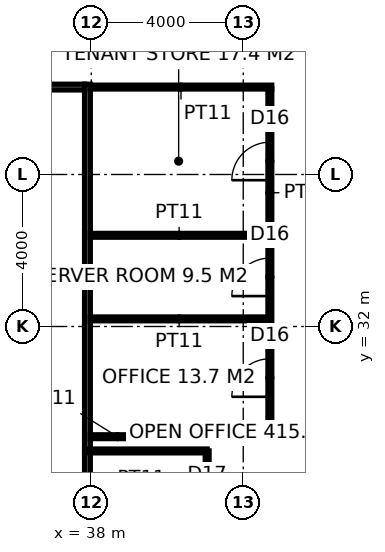
"""IFC4 building model, lengths in metres.
Left out: names, types, materials, properties, quantities, classifications, styles, units other than length and angle.
Written with IfcOpenShell. Run it as: python <this file> out.ifc"""

import sys

from ifc_helpers import new_model, si_unit, direction, frame, frame_2d, origin, place, context, subcontext, project, spatial, rectangle, extrude, element, fill, save


model = new_model("IFC4")
c1 = context("Model", 3, precision=1e-05, world=origin(), true_north=direction((0.0, 1.0)))
c2 = subcontext(c1, "Body", "Model", "MODEL_VIEW")
j1 = project(units=[si_unit("LENGTHUNIT", "METRE"), si_unit("PLANEANGLEUNIT", "RADIAN")], contexts=[c1])
p1 = place(None, origin())
s1 = spatial("IfcSite", under=j1, at=p1, CompositionType="ELEMENT")
p2 = place(p1, origin())
s2 = spatial("IfcBuilding", under=s1, at=p2, CompositionType="ELEMENT")
p3 = place(p2, frame((0.0, 0.0, 199.8)))
s3 = spatial("IfcBuildingStorey", under=s2, at=p3, CompositionType="ELEMENT", Elevation=199.8)
p4 = place(p3, frame((37.9, 15.625, 0.0), z_axis=(0.0, 0.0, 1.0), x_axis=(0.0, 1.0, 0.0)))
e1 = element("IfcWall", 1, at=p4, inside=s3, PredefinedType="PARTITIONING", context=c2, shape_type="SweptSolid", body=[
    extrude(rectangle(XDim=22.75, YDim=0.15, at=frame_2d((11.375, 0.0))), origin(), (0.0, 0.0, 1.0), 2.85),
])
p5 = place(p4, frame((10.475, 0.0, 0.0)))
e2 = element("IfcOpeningElement", 2, at=p5, cuts=e1, PredefinedType="OPENING", context=c2, shape_type="SweptSolid", body=[
    extrude(rectangle(XDim=1.8, YDim=2.4, at=frame_2d((0.9, 1.2))), frame((0.0, 0.085, 0.0), z_axis=(0.0, -1.0, 0.0), x_axis=(1.0, 0.0, 0.0)), (0.0, 0.0, 1.0), 0.17),
])
p6 = place(p3, frame((17.5, 38.3, 0.0), z_axis=(0.0, 0.0, 1.0), x_axis=(1.0, 0.0, 0.0)))
e3 = element("IfcWall", 3, at=p6, inside=s3, PredefinedType="PARTITIONING", context=c2, shape_type="SweptSolid", body=[
    extrude(rectangle(XDim=20.325, YDim=0.15, at=frame_2d((10.163, 0.0))), origin(), (0.0, 0.0, 1.0), 3.85),
])
p7 = place(p6, frame((6.25, 0.0, 0.0)))
e4 = element("IfcOpeningElement", 4, at=p7, cuts=e3, PredefinedType="OPENING", context=c2, shape_type="SweptSolid", body=[
    extrude(rectangle(XDim=0.9, YDim=2.1, at=frame_2d((0.45, 1.05))), frame((0.0, 0.085, 0.0), z_axis=(0.0, -1.0, 0.0), x_axis=(1.0, 0.0, 0.0)), (0.0, 0.0, 1.0), 0.17),
])
p8 = place(p6, frame((10.0, 0.0, 0.0)))
e5 = element("IfcOpeningElement", 5, at=p8, cuts=e3, PredefinedType="OPENING", context=c2, shape_type="SweptSolid", body=[
    extrude(rectangle(XDim=1.0, YDim=2.1, at=frame_2d((0.5, 1.05))), frame((0.0, 0.085, 0.0), z_axis=(0.0, -1.0, 0.0), x_axis=(1.0, 0.0, 0.0)), (0.0, 0.0, 1.0), 0.17),
])
p9 = place(p6, frame((13.85, 0.0, 0.0)))
e6 = element("IfcOpeningElement", 6, at=p9, cuts=e3, PredefinedType="OPENING", context=c2, shape_type="SweptSolid", body=[
    extrude(rectangle(XDim=0.9, YDim=2.1, at=frame_2d((0.45, 1.05))), frame((0.0, 0.085, 0.0), z_axis=(0.0, -1.0, 0.0), x_axis=(1.0, 0.0, 0.0)), (0.0, 0.0, 1.0), 0.17),
])
p10 = place(p3, frame((37.975, 29.1, 0.0), z_axis=(0.0, 0.0, 1.0), x_axis=(1.0, 0.0, 0.0)))
e7 = element("IfcWall", 7, at=p10, inside=s3, PredefinedType="PARTITIONING", context=c2, shape_type="SweptSolid", body=[
    extrude(rectangle(XDim=4.775, YDim=0.1, at=frame_2d((2.387, 0.0))), origin(), (0.0, 0.0, 1.0), 3.85),
])
p11 = place(p3, frame((37.975, 32.2, 0.0), z_axis=(0.0, 0.0, 1.0), x_axis=(1.0, 0.0, 0.0)))
e8 = element("IfcWall", 8, at=p11, inside=s3, PredefinedType="PARTITIONING", context=c2, shape_type="SweptSolid", body=[
    extrude(rectangle(XDim=4.675, YDim=0.1, at=frame_2d((2.337, 0.0))), origin(), (0.0, 0.0, 1.0), 2.65),
])
p12 = place(p3, frame((37.975, 34.4, 0.0), z_axis=(0.0, 0.0, 1.0), x_axis=(1.0, 0.0, 0.0)))
e9 = element("IfcWall", 9, at=p12, inside=s3, PredefinedType="PARTITIONING", context=c2, shape_type="SweptSolid", body=[
    extrude(rectangle(XDim=4.675, YDim=0.1, at=frame_2d((2.337, 0.0))), origin(), (0.0, 0.0, 1.0), 3.85),
])
p13 = place(p3, frame((37.975, 38.3, 0.0), z_axis=(0.0, 0.0, 1.0), x_axis=(1.0, 0.0, 0.0)))
e10 = element("IfcWall", 10, at=p13, inside=s3, PredefinedType="PARTITIONING", context=c2, shape_type="SweptSolid", body=[
    extrude(rectangle(XDim=4.775, YDim=0.1, at=frame_2d((2.387, 0.0))), origin(), (0.0, 0.0, 1.0), 3.85),
])
p14 = place(p3, frame((42.7, 29.15, 0.0), z_axis=(0.0, 0.0, 1.0), x_axis=(0.0, 1.0, 0.0)))
e11 = element("IfcWall", 11, at=p14, inside=s3, PredefinedType="PARTITIONING", context=c2, shape_type="SweptSolid", body=[
    extrude(rectangle(XDim=9.1, YDim=0.1, at=frame_2d((4.55, 0.0))), origin(), (0.0, 0.0, 1.0), 3.85),
])
p15 = place(p14, frame((1.0, 0.0, 0.0)))
e12 = element("IfcOpeningElement", 12, at=p15, cuts=e11, PredefinedType="OPENING", context=c2, shape_type="SweptSolid", body=[
    extrude(rectangle(XDim=1.0, YDim=2.2, at=frame_2d((0.5, 1.1))), frame((0.0, 0.06, 0.0), z_axis=(0.0, -1.0, 0.0), x_axis=(1.0, 0.0, 0.0)), (0.0, 0.0, 1.0), 0.12),
])
p16 = place(p14, frame((3.65, 0.0, 0.0)))
e13 = element("IfcOpeningElement", 13, at=p16, cuts=e11, PredefinedType="OPENING", context=c2, shape_type="SweptSolid", body=[
    extrude(rectangle(XDim=1.0, YDim=2.2, at=frame_2d((0.5, 1.1))), frame((0.0, 0.06, 0.0), z_axis=(0.0, -1.0, 0.0), x_axis=(1.0, 0.0, 0.0)), (0.0, 0.0, 1.0), 0.12),
])
p17 = place(p14, frame((6.7, 0.0, 0.0)))
e14 = element("IfcOpeningElement", 14, at=p17, cuts=e11, PredefinedType="OPENING", context=c2, shape_type="SweptSolid", body=[
    extrude(rectangle(XDim=1.0, YDim=2.2, at=frame_2d((0.5, 1.1))), frame((0.0, 0.06, 0.0), z_axis=(0.0, -1.0, 0.0), x_axis=(1.0, 0.0, 0.0)), (0.0, 0.0, 1.0), 0.12),
])
p18 = place(p3, frame((41.05, 25.275, 0.0), z_axis=(0.0, 0.0, 1.0), x_axis=(0.0, 1.0, 0.0)))
e15 = element("IfcWall", 15, at=p18, inside=s3, PredefinedType="PARTITIONING", context=c2, shape_type="SweptSolid", body=[
    extrude(rectangle(XDim=3.45, YDim=0.1, at=frame_2d((1.725, 0.0))), origin(), (0.0, 0.0, 1.0), 3.85),
])
p19 = place(p18, frame((1.225, 0.0, 0.0)))
e16 = element("IfcOpeningElement", 16, at=p19, cuts=e15, PredefinedType="OPENING", context=c2, shape_type="SweptSolid", body=[
    extrude(rectangle(XDim=1.0, YDim=2.2, at=frame_2d((0.5, 1.1))), frame((0.0, 0.06, 0.0), z_axis=(0.0, -1.0, 0.0), x_axis=(1.0, 0.0, 0.0)), (0.0, 0.0, 1.0), 0.12),
])
p20 = place(p3, frame((41.05, 28.725, 0.0), z_axis=(0.0, 0.0, 1.0), x_axis=(-1.0, 0.0, 0.0)))
e17 = element("IfcWall", 17, at=p20, inside=s3, PredefinedType="PARTITIONING", context=c2, shape_type="SweptSolid", body=[
    extrude(rectangle(XDim=3.15, YDim=0.1, at=frame_2d((1.575, 0.0))), origin(), (0.0, 0.0, 1.0), 3.85),
])
p21 = place(p15, origin())
e18 = element("IfcDoor", 18, at=p21, inside=s3, OperationType="SINGLE_SWING_LEFT", PredefinedType="DOOR", context=c2, shape_type="SweptSolid", body=[
    extrude(rectangle(XDim=1.0, YDim=2.2, at=frame_2d((0.5, 1.1))), frame((0.0, 0.025, 0.0), z_axis=(0.0, -1.0, 0.0), x_axis=(1.0, 0.0, 0.0)), (0.0, 0.0, 1.0), 0.05),
])
fill(e12, e18)
p22 = place(p16, origin())
e19 = element("IfcDoor", 19, at=p22, inside=s3, OperationType="SINGLE_SWING_LEFT", PredefinedType="DOOR", context=c2, shape_type="SweptSolid", body=[
    extrude(rectangle(XDim=1.0, YDim=2.2, at=frame_2d((0.5, 1.1))), frame((0.0, 0.025, 0.0), z_axis=(0.0, -1.0, 0.0), x_axis=(1.0, 0.0, 0.0)), (0.0, 0.0, 1.0), 0.05),
])
fill(e13, e19)
p23 = place(p17, origin())
e20 = element("IfcDoor", 20, at=p23, inside=s3, OperationType="SINGLE_SWING_LEFT", PredefinedType="DOOR", context=c2, shape_type="SweptSolid", body=[
    extrude(rectangle(XDim=1.0, YDim=2.2, at=frame_2d((0.5, 1.1))), frame((0.0, 0.025, 0.0), z_axis=(0.0, -1.0, 0.0), x_axis=(1.0, 0.0, 0.0)), (0.0, 0.0, 1.0), 0.05),
])
fill(e14, e20)
save(model, sys.argv[1])
